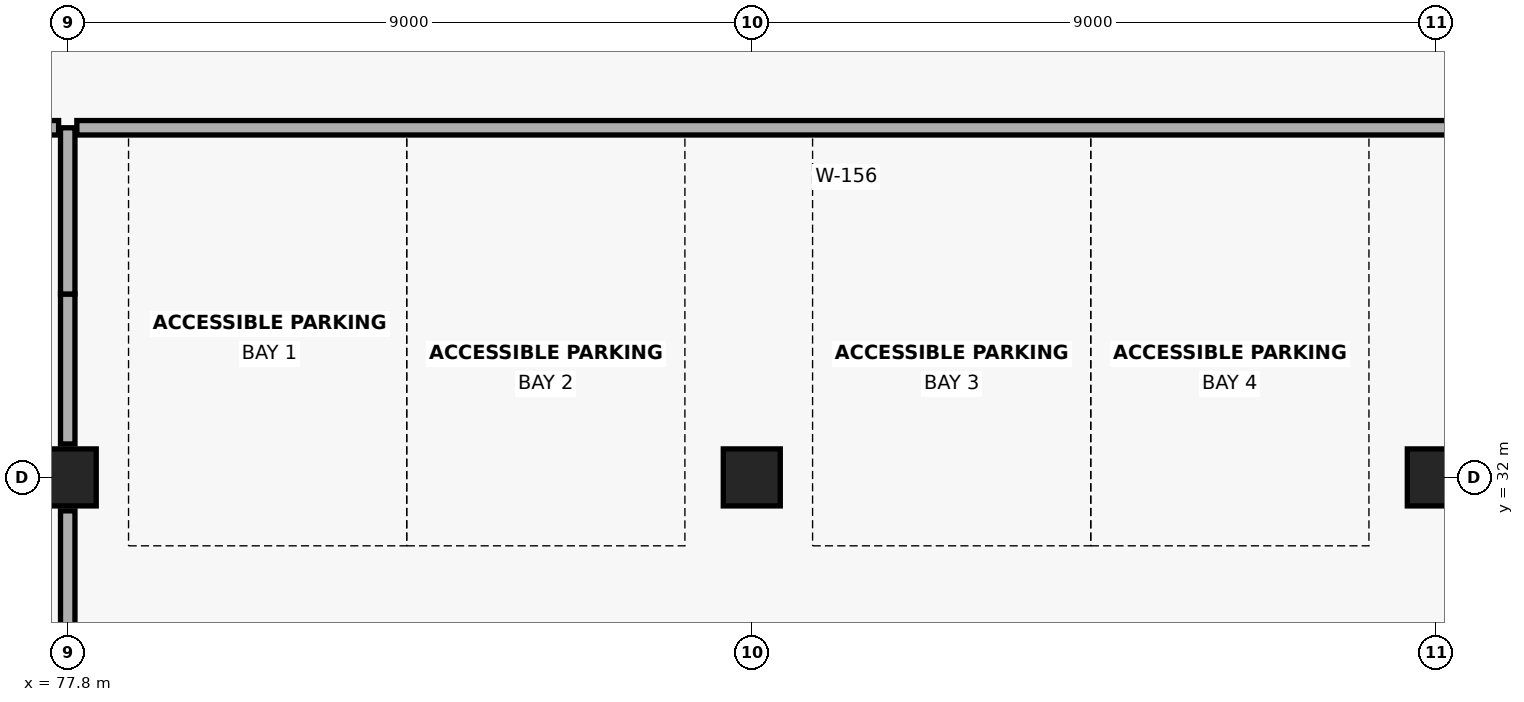
"""IFC4 building model, lengths in metres.
Left out: names, types, materials, properties, quantities, classifications, styles, units other than length and angle.
Written with IfcOpenShell. Run it as: python <this file> out.ifc"""

import sys

from ifc_helpers import new_model, si_unit, direction, frame, frame_2d, origin, origin_2d, place, context, subcontext, project, spatial, rectangle, extrude, element, save


model = new_model("IFC4")
c1 = context("Model", 3, precision=1e-05, world=origin(), true_north=direction((0.0, 1.0)))
c2 = subcontext(c1, "Body", "Model", "MODEL_VIEW")
j1 = project(units=[si_unit("LENGTHUNIT", "METRE"), si_unit("PLANEANGLEUNIT", "RADIAN")], contexts=[c1])
p1 = place(None, origin())
s1 = spatial("IfcSite", under=j1, at=p1, CompositionType="ELEMENT")
p2 = place(p1, origin())
s2 = spatial("IfcBuilding", under=s1, at=p2, CompositionType="ELEMENT")
p3 = place(p2, frame((0.0, 0.0, -4.5)))
s3 = spatial("IfcBuildingStorey", under=s2, at=p3, CompositionType="ELEMENT", Elevation=-4.5)
for number, where, z_axis, x_axis in (
    (1, (77.8, 32.0, 0.0), (0.0, 0.0, 1.0), (1.0, 0.0, 0.0)),
    (2, (86.8, 32.0, 0.0), (0.0, 0.0, 1.0), (1.0, 0.0, 0.0)),
    (3, (95.8, 32.0, 0.0), (0.0, 0.0, 1.0), (1.0, 0.0, 0.0)),
):
    element("IfcColumn", number, at=place(p3, frame(where, z_axis=z_axis, x_axis=x_axis)), inside=s3, PredefinedType="COLUMN", context=c2, shape_type="SweptSolid", body=[
        extrude(rectangle(XDim=0.75, YDim=0.75, at=origin_2d()), origin(), (0.0, 0.0, 1.0), 4.5),
    ])
p4 = place(p3, frame((77.8, 23.64, 0.0), z_axis=(0.0, 0.0, 1.0), x_axis=(0.0, 1.0, 0.0)))
e4 = element("IfcWall", 4, at=p4, inside=s3, PredefinedType="STANDARD", context=c2, shape_type="SweptSolid", body=[
    extrude(rectangle(XDim=7.92, YDim=0.19, at=frame_2d((3.96, 0.0))), origin(), (0.0, 0.0, 1.0), 3.29),
])
p5 = place(p3, frame((77.8, 32.44, 0.0), z_axis=(0.0, 0.0, 1.0), x_axis=(0.0, 1.0, 0.0)))
e5 = element("IfcWall", 5, at=p5, inside=s3, PredefinedType="STANDARD", context=c2, shape_type="SweptSolid", body=[
    extrude(rectangle(XDim=1.973, YDim=0.19, at=frame_2d((0.986, 0.0))), origin(), (0.0, 0.0, 1.0), 3.09),
])
p6 = place(p3, frame((77.8, 34.413, 0.0), z_axis=(0.0, 0.0, 1.0), x_axis=(0.0, 1.0, 0.0)))
e6 = element("IfcWall", 6, at=p6, inside=s3, PredefinedType="STANDARD", context=c2, shape_type="SweptSolid", body=[
    extrude(rectangle(XDim=2.187, YDim=0.19, at=frame_2d((1.094, 0.0))), origin(), (0.0, 0.0, 1.0), 4.14),
])
p7 = place(p3, frame((77.68, 36.6, 0.0), z_axis=(0.0, 0.0, 1.0), x_axis=(-1.0, 0.0, 0.0)))
e7 = element("IfcWall", 7, at=p7, inside=s3, PredefinedType="STANDARD", context=c2, shape_type="SweptSolid", body=[
    extrude(rectangle(XDim=35.96, YDim=0.19, at=frame_2d((17.98, 0.0))), origin(), (0.0, 0.0, 1.0), 4.14),
])
p8 = place(p7, frame((12.253, 0.0, 0.0)))
e8 = element("IfcOpeningElement", 8, at=p8, cuts=e7, PredefinedType="OPENING", context=c2, shape_type="SweptSolid", body=[
    extrude(rectangle(XDim=1.6, YDim=2.25, at=frame_2d((0.8, 1.125))), frame((0.0, 0.107, 0.0), z_axis=(0.0, -1.0, 0.0), x_axis=(1.0, 0.0, 0.0)), (0.0, 0.0, 1.0), 0.214),
])
p9 = place(p3, frame((114.08, 36.6, 0.0), z_axis=(0.0, 0.0, 1.0), x_axis=(-1.0, 0.0, 0.0)))
e9 = element("IfcWall", 9, at=p9, inside=s3, PredefinedType="STANDARD", context=c2, shape_type="SweptSolid", body=[
    extrude(rectangle(XDim=36.16, YDim=0.19, at=frame_2d((18.08, 0.0))), origin(), (0.0, 0.0, 1.0), 4.14),
])
p10 = place(p9, frame((12.247, 0.0, 0.0)))
e10 = element("IfcOpeningElement", 10, at=p10, cuts=e9, PredefinedType="OPENING", context=c2, shape_type="SweptSolid", body=[
    extrude(rectangle(XDim=1.6, YDim=2.25, at=frame_2d((0.8, 1.125))), frame((0.0, 0.107, 0.0), z_axis=(0.0, -1.0, 0.0), x_axis=(1.0, 0.0, 0.0)), (0.0, 0.0, 1.0), 0.214),
])
save(model, sys.argv[1])
